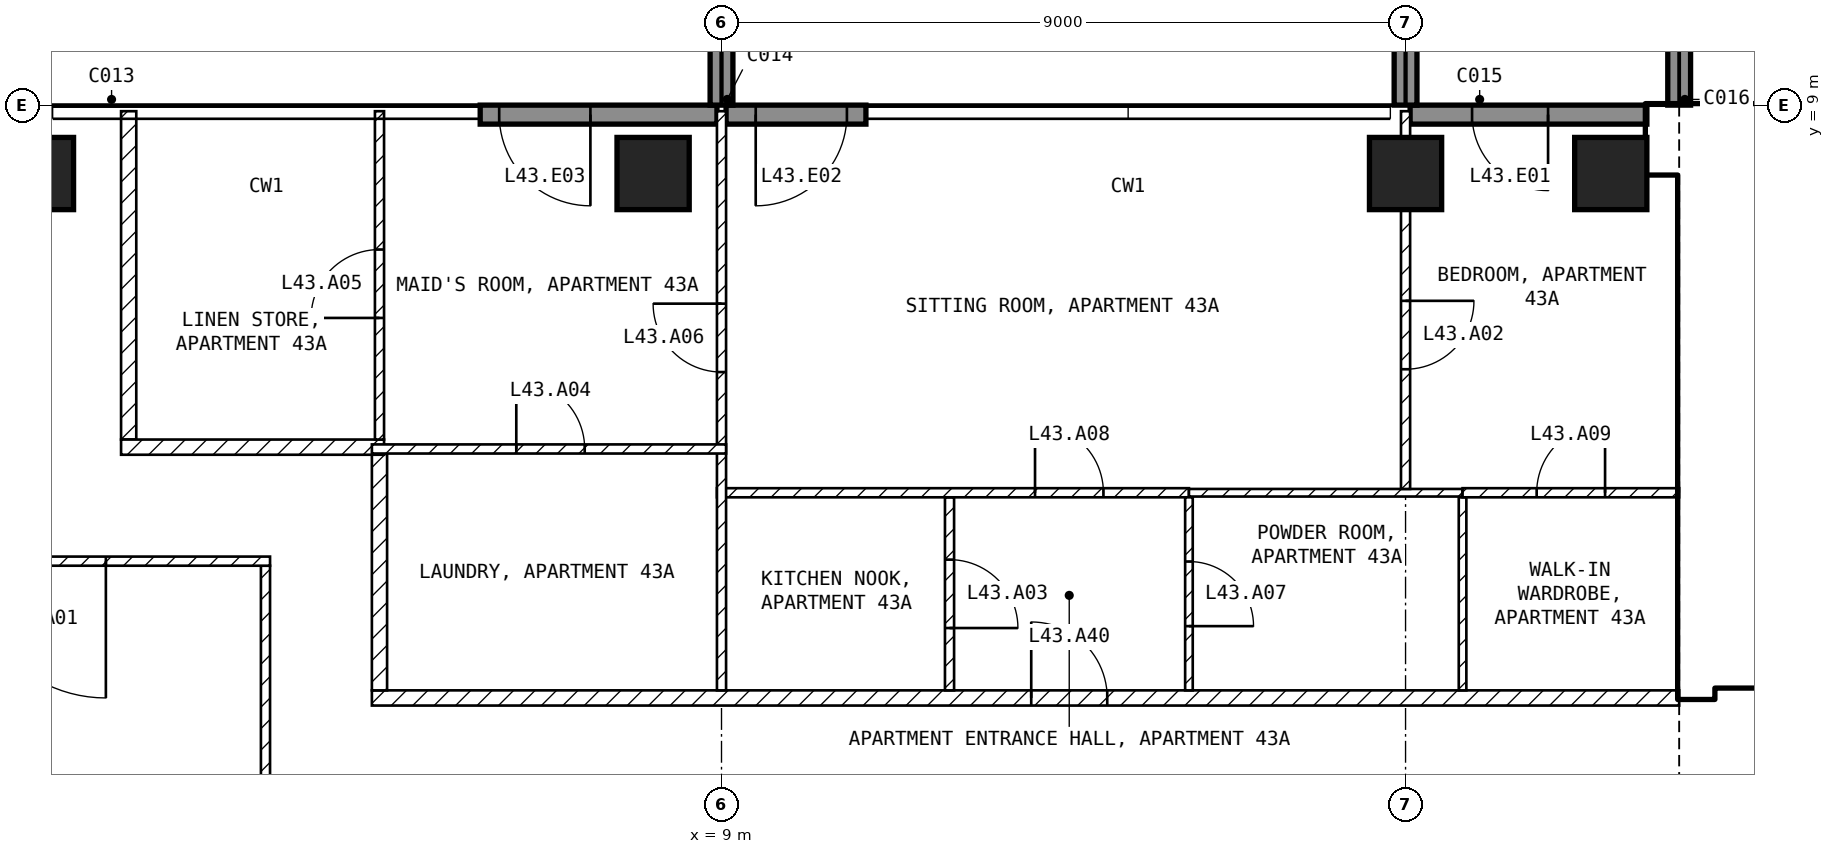
"""IFC4 building model, lengths in metres.
Left out: names, types, materials, properties, quantities, classifications, styles, units other than length and angle.
Written with IfcOpenShell. Run it as: python <this file> out.ifc"""

import sys

from ifc_helpers import new_model, si_unit, direction, frame, frame_2d, origin, origin_2d, place, context, subcontext, project, spatial, rectangle, extrude, element, fill, save


model = new_model("IFC4")
c1 = context("Model", 3, precision=1e-05, world=origin(), true_north=direction((0.0, 1.0)))
c2 = subcontext(c1, "Body", "Model", "MODEL_VIEW")
j1 = project(units=[si_unit("LENGTHUNIT", "METRE"), si_unit("PLANEANGLEUNIT", "RADIAN")], contexts=[c1])
p1 = place(None, origin())
s1 = spatial("IfcSite", under=j1, at=p1, CompositionType="ELEMENT")
p2 = place(p1, origin())
s2 = spatial("IfcBuilding", under=s1, at=p2, CompositionType="ELEMENT")
p3 = place(p2, frame((0.0, 0.0, 177.1)))
s3 = spatial("IfcBuildingStorey", under=s2, at=p3, CompositionType="ELEMENT", Elevation=177.1)
for number, where, z_axis, x_axis in (
    (1, (0.0, 8.1, -0.25), (0.0, 0.0, 1.0), (1.0, 0.0, 0.0)),
    (2, (8.1, 8.1, -0.25), (0.0, 0.0, 1.0), (1.0, 0.0, 0.0)),
    (3, (18.0, 8.1, -0.25), (0.0, 0.0, 1.0), (1.0, 0.0, 0.0)),
    (4, (20.7, 8.1, -0.25), (0.0, 0.0, 1.0), (1.0, 0.0, 0.0)),
):
    element("IfcColumn", number, at=place(p3, frame(where, z_axis=z_axis, x_axis=x_axis)), inside=s3, PredefinedType="COLUMN", context=c2, shape_type="SweptSolid", body=[
        extrude(rectangle(XDim=0.95, YDim=0.95, at=origin_2d()), origin(), (0.0, 0.0, 1.0), 3.5),
    ])
p4 = place(p3, frame((21.175, 8.875, 0.0), z_axis=(0.0, 0.0, 1.0), x_axis=(-1.0, 0.0, 0.0)))
e5 = element("IfcWall", 5, at=p4, inside=s3, PredefinedType="SOLIDWALL", context=c2, shape_type="SweptSolid", body=[
    extrude(rectangle(XDim=3.115, YDim=0.25, at=frame_2d((1.558, 0.0))), origin(), (0.0, 0.0, 1.0), 3.25),
])
p5 = place(p4, frame((1.3, 0.0, 0.0)))
e6 = element("IfcOpeningElement", 6, at=p5, cuts=e5, PredefinedType="OPENING", context=c2, shape_type="SweptSolid", body=[
    extrude(rectangle(XDim=1.0, YDim=2.4, at=frame_2d((0.5, 1.2))), frame((0.0, 0.135, 0.0), z_axis=(0.0, -1.0, 0.0), x_axis=(1.0, 0.0, 0.0)), (0.0, 0.0, 1.0), 0.27),
])
p6 = place(p3, frame((10.9, 8.875, 0.0), z_axis=(0.0, 0.0, 1.0), x_axis=(-1.0, 0.0, 0.0)))
e7 = element("IfcWall", 7, at=p6, inside=s3, PredefinedType="SOLIDWALL", context=c2, shape_type="SweptSolid", body=[
    extrude(rectangle(XDim=1.84, YDim=0.25, at=frame_2d((0.92, 0.0))), origin(), (0.0, 0.0, 1.0), 3.25),
])
p7 = place(p6, frame((0.25, 0.0, 0.0)))
e8 = element("IfcOpeningElement", 8, at=p7, cuts=e7, PredefinedType="OPENING", context=c2, shape_type="SweptSolid", body=[
    extrude(rectangle(XDim=1.2, YDim=2.4, at=frame_2d((0.6, 1.2))), frame((0.0, 0.135, 0.0), z_axis=(0.0, -1.0, 0.0), x_axis=(1.0, 0.0, 0.0)), (0.0, 0.0, 1.0), 0.27),
])
p8 = place(p3, frame((8.94, 8.875, 0.0), z_axis=(0.0, 0.0, 1.0), x_axis=(-1.0, 0.0, 0.0)))
e9 = element("IfcWall", 9, at=p8, inside=s3, PredefinedType="SOLIDWALL", context=c2, shape_type="SweptSolid", body=[
    extrude(rectangle(XDim=3.115, YDim=0.25, at=frame_2d((1.558, 0.0))), origin(), (0.0, 0.0, 1.0), 3.25),
])
p9 = place(p8, frame((1.665, 0.0, 0.0)))
e10 = element("IfcOpeningElement", 10, at=p9, cuts=e9, PredefinedType="OPENING", context=c2, shape_type="SweptSolid", body=[
    extrude(rectangle(XDim=1.2, YDim=2.4, at=frame_2d((0.6, 1.2))), frame((0.0, 0.135, 0.0), z_axis=(0.0, -1.0, 0.0), x_axis=(1.0, 0.0, 0.0)), (0.0, 0.0, 1.0), 0.27),
])
for number, where, z_axis, x_axis in (
    (11, (9.0, 9.0, 0.0), (0.0, 0.0, 1.0), (0.0, 1.0, 0.0)),
    (12, (18.0, 9.0, 0.0), (0.0, 0.0, 1.0), (0.0, 1.0, 0.0)),
    (13, (21.6, 9.0, 0.0), (0.0, 0.0, 1.0), (0.0, 1.0, 0.0)),
):
    element("IfcWall", number, at=place(p3, frame(where, z_axis=z_axis, x_axis=x_axis)), inside=s3, PredefinedType="SOLIDWALL", context=c2, shape_type="SweptSolid", body=[
        extrude(rectangle(XDim=2.7, YDim=0.3, at=frame_2d((1.35, 0.0))), origin(), (0.0, 0.0, 1.0), 3.25),
    ])
p10 = place(p3, frame((21.175, 8.55, 0.0), z_axis=(0.0, 0.0, 1.0), x_axis=(1.0, 0.0, 0.0)))
e14 = element("IfcWall", 14, at=p10, inside=s3, PredefinedType="SHEAR", context=c2, shape_type="SweptSolid", body=[
    extrude(rectangle(XDim=8.425, YDim=0.9, at=frame_2d((4.212, 0.0))), origin(), (0.0, 0.0, 1.0), 3.25),
])
p11 = place(p3, frame((21.825, 1.2, 0.0), z_axis=(0.0, 0.0, 1.0), x_axis=(0.0, 1.0, 0.0)))
e15 = element("IfcWall", 15, at=p11, inside=s3, PredefinedType="SHEAR", context=c2, shape_type="SweptSolid", body=[
    extrude(rectangle(XDim=6.9, YDim=0.45, at=frame_2d((3.45, 0.0))), origin(), (0.0, 0.0, 1.0), 3.25),
])
p12 = place(p3, frame((22.05, 1.45, 0.0), z_axis=(0.0, 0.0, 1.0), x_axis=(1.0, 0.0, 0.0)))
e16 = element("IfcWall", 16, at=p12, inside=s3, PredefinedType="SOLIDWALL", context=c2, shape_type="SweptSolid", body=[
    extrude(rectangle(XDim=11.15, YDim=0.2, at=frame_2d((5.575, 0.0))), origin(), (0.0, 0.0, 1.0), 3.25),
])
p13 = place(p12, frame((0.75, 0.0, 0.0)))
e17 = element("IfcOpeningElement", 17, at=p13, cuts=e16, PredefinedType="OPENING", context=c2, shape_type="SweptSolid", body=[
    extrude(rectangle(XDim=1.0, YDim=2.1, at=frame_2d((0.5, 1.05))), frame((0.0, 0.11, 0.0), z_axis=(0.0, -1.0, 0.0), x_axis=(1.0, 0.0, 0.0)), (0.0, 0.0, 1.0), 0.22),
])
p14 = place(p12, frame((3.25, 0.0, 0.0)))
e18 = element("IfcOpeningElement", 18, at=p14, cuts=e16, PredefinedType="OPENING", context=c2, shape_type="SweptSolid", body=[
    extrude(rectangle(XDim=1.0, YDim=2.1, at=frame_2d((0.5, 1.05))), frame((0.0, 0.11, 0.0), z_axis=(0.0, -1.0, 0.0), x_axis=(1.0, 0.0, 0.0)), (0.0, 0.0, 1.0), 0.22),
])
p15 = place(p12, frame((9.15, 0.0, 0.0)))
e19 = element("IfcOpeningElement", 19, at=p15, cuts=e16, PredefinedType="OPENING", context=c2, shape_type="SweptSolid", body=[
    extrude(rectangle(XDim=0.9, YDim=2.1, at=frame_2d((0.45, 1.05))), frame((0.0, 0.11, 0.0), z_axis=(0.0, -1.0, 0.0), x_axis=(1.0, 0.0, 0.0)), (0.0, 0.0, 1.0), 0.22),
])
p16 = place(p3, frame((22.05, 5.15, 0.0), z_axis=(0.0, 0.0, 1.0), x_axis=(1.0, 0.0, 0.0)))
e20 = element("IfcWall", 20, at=p16, inside=s3, PredefinedType="SOLIDWALL", context=c2, shape_type="SweptSolid", body=[
    extrude(rectangle(XDim=6.3, YDim=0.2, at=frame_2d((3.15, 0.0))), origin(), (0.0, 0.0, 1.0), 3.25),
])
p17 = place(p16, frame((0.2, 0.0, 0.0)))
e21 = element("IfcOpeningElement", 21, at=p17, cuts=e20, PredefinedType="OPENING", context=c2, shape_type="SweptSolid", body=[
    extrude(rectangle(XDim=1.0, YDim=2.1, at=frame_2d((0.5, 1.05))), frame((0.0, 0.11, 0.0), z_axis=(0.0, -1.0, 0.0), x_axis=(1.0, 0.0, 0.0)), (0.0, 0.0, 1.0), 0.22),
])
p18 = place(p3, frame((3.0, -2.94, 0.0), z_axis=(0.0, 0.0, 1.0), x_axis=(0.0, 1.0, 0.0)))
e22 = element("IfcWall", 22, at=p18, inside=s3, PredefinedType="PARTITIONING", context=c2, shape_type="SweptSolid", body=[
    extrude(rectangle(XDim=5.88, YDim=0.12, at=frame_2d((2.94, 0.0))), origin(), (0.0, 0.0, 1.0), 3.25),
])
p19 = place(p3, frame((3.06, 3.0, 0.0), z_axis=(0.0, 0.0, 1.0), x_axis=(-1.0, 0.0, 0.0)))
e23 = element("IfcWall", 23, at=p19, inside=s3, PredefinedType="PARTITIONING", context=c2, shape_type="SweptSolid", body=[
    extrude(rectangle(XDim=6.12, YDim=0.12, at=frame_2d((3.06, 0.0))), origin(), (0.0, 0.0, 1.0), 3.25),
])
p20 = place(p19, frame((2.16, 0.0, 0.0)))
e24 = element("IfcOpeningElement", 24, at=p20, cuts=e23, PredefinedType="OPENING", context=c2, shape_type="SweptSolid", body=[
    extrude(rectangle(XDim=1.8, YDim=2.1, at=frame_2d((0.9, 1.05))), frame((0.0, 0.07, 0.0), z_axis=(0.0, -1.0, 0.0), x_axis=(1.0, 0.0, 0.0)), (0.0, 0.0, 1.0), 0.14),
])
p21 = place(p3, frame((4.4, 1.2, 0.0), z_axis=(0.0, 0.0, 1.0), x_axis=(1.0, 0.0, 0.0)))
e25 = element("IfcWall", 25, at=p21, inside=s3, PredefinedType="PARTITIONING", context=c2, shape_type="SweptSolid", body=[
    extrude(rectangle(XDim=17.2, YDim=0.2, at=frame_2d((8.6, 0.0))), origin(), (0.0, 0.0, 1.0), 3.25),
])
p22 = place(p21, frame((8.675, 0.0, 0.0)))
e26 = element("IfcOpeningElement", 26, at=p22, cuts=e25, PredefinedType="OPENING", context=c2, shape_type="SweptSolid", body=[
    extrude(rectangle(XDim=1.0, YDim=2.1, at=frame_2d((0.5, 1.05))), frame((0.0, 0.11, 0.0), z_axis=(0.0, -1.0, 0.0), x_axis=(1.0, 0.0, 0.0)), (0.0, 0.0, 1.0), 0.22),
])
p23 = place(p3, frame((4.5, 4.416, 0.0), z_axis=(0.0, 0.0, 1.0), x_axis=(0.0, -1.0, 0.0)))
e27 = element("IfcWall", 27, at=p23, inside=s3, PredefinedType="PARTITIONING", context=c2, shape_type="SweptSolid", body=[
    extrude(rectangle(XDim=3.116, YDim=0.2, at=frame_2d((1.558, 0.0))), origin(), (0.0, 0.0, 1.0), 3.25),
])
p24 = place(p3, frame((1.2, 8.92, 0.0), z_axis=(0.0, 0.0, 1.0), x_axis=(0.0, -1.0, 0.0)))
e28 = element("IfcWall", 28, at=p24, inside=s3, PredefinedType="PARTITIONING", context=c2, shape_type="SweptSolid", body=[
    extrude(rectangle(XDim=4.32, YDim=0.2, at=frame_2d((2.16, 0.0))), origin(), (0.0, 0.0, 1.0), 3.25),
])
p25 = place(p3, frame((1.1, 4.5, 0.0), z_axis=(0.0, 0.0, 1.0), x_axis=(1.0, 0.0, 0.0)))
e29 = element("IfcWall", 29, at=p25, inside=s3, PredefinedType="PARTITIONING", context=c2, shape_type="SweptSolid", body=[
    extrude(rectangle(XDim=3.46, YDim=0.2, at=frame_2d((1.73, 0.0))), origin(), (0.0, 0.0, 1.0), 3.25),
])
p26 = place(p3, frame((12.0, 3.84, 0.0), z_axis=(0.0, 0.0, 1.0), x_axis=(0.0, -1.0, 0.0)))
e30 = element("IfcWall", 30, at=p26, inside=s3, PredefinedType="PARTITIONING", context=c2, shape_type="SweptSolid", body=[
    extrude(rectangle(XDim=2.54, YDim=0.12, at=frame_2d((1.27, 0.0))), origin(), (0.0, 0.0, 1.0), 3.25),
])
p27 = place(p26, frame((0.82, 0.0, 0.0)))
e31 = element("IfcOpeningElement", 31, at=p27, cuts=e30, PredefinedType="OPENING", context=c2, shape_type="SweptSolid", body=[
    extrude(rectangle(XDim=0.9, YDim=2.1, at=frame_2d((0.45, 1.05))), frame((0.0, 0.07, 0.0), z_axis=(0.0, -1.0, 0.0), x_axis=(1.0, 0.0, 0.0)), (0.0, 0.0, 1.0), 0.14),
])
p28 = place(p3, frame((8.94, 3.9, 0.0), z_axis=(0.0, 0.0, 1.0), x_axis=(1.0, 0.0, 0.0)))
e32 = element("IfcWall", 32, at=p28, inside=s3, PredefinedType="PARTITIONING", context=c2, shape_type="SweptSolid", body=[
    extrude(rectangle(XDim=6.21, YDim=0.12, at=frame_2d((3.105, 0.0))), origin(), (0.0, 0.0, 1.0), 3.25),
])
p29 = place(p28, frame((4.185, 0.0, 0.0)))
e33 = element("IfcOpeningElement", 33, at=p29, cuts=e32, PredefinedType="OPENING", context=c2, shape_type="SweptSolid", body=[
    extrude(rectangle(XDim=0.9, YDim=2.1, at=frame_2d((0.45, 1.05))), frame((0.0, 0.07, 0.0), z_axis=(0.0, -1.0, 0.0), x_axis=(1.0, 0.0, 0.0)), (0.0, 0.0, 1.0), 0.14),
])
p30 = place(p3, frame((9.0, 1.3, 0.0), z_axis=(0.0, 0.0, 1.0), x_axis=(0.0, 1.0, 0.0)))
e34 = element("IfcWall", 34, at=p30, inside=s3, PredefinedType="PARTITIONING", context=c2, shape_type="SweptSolid", body=[
    extrude(rectangle(XDim=7.62, YDim=0.12, at=frame_2d((3.81, 0.0))), origin(), (0.0, 0.0, 1.0), 3.25),
])
p31 = place(p30, frame((4.188, 0.0, 0.0)))
e35 = element("IfcOpeningElement", 35, at=p31, cuts=e34, PredefinedType="OPENING", context=c2, shape_type="SweptSolid", body=[
    extrude(rectangle(XDim=0.9, YDim=2.1, at=frame_2d((0.45, 1.05))), frame((0.0, 0.07, 0.0), z_axis=(0.0, -1.0, 0.0), x_axis=(1.0, 0.0, 0.0)), (0.0, 0.0, 1.0), 0.14),
])
p32 = place(p3, frame((15.15, 3.84, 0.0), z_axis=(0.0, 0.0, 1.0), x_axis=(0.0, -1.0, 0.0)))
e36 = element("IfcWall", 36, at=p32, inside=s3, PredefinedType="PARTITIONING", context=c2, shape_type="SweptSolid", body=[
    extrude(rectangle(XDim=2.54, YDim=0.1, at=frame_2d((1.27, 0.0))), origin(), (0.0, 0.0, 1.0), 3.25),
])
p33 = place(p32, frame((0.845, 0.0, 0.0)))
e37 = element("IfcOpeningElement", 37, at=p33, cuts=e36, PredefinedType="OPENING", context=c2, shape_type="SweptSolid", body=[
    extrude(rectangle(XDim=0.85, YDim=2.1, at=frame_2d((0.425, 1.05))), frame((0.0, 0.06, 0.0), z_axis=(0.0, -1.0, 0.0), x_axis=(1.0, 0.0, 0.0)), (0.0, 0.0, 1.0), 0.12),
])
p34 = place(p3, frame((18.75, 3.84, 0.0), z_axis=(0.0, 0.0, 1.0), x_axis=(0.0, -1.0, 0.0)))
e38 = element("IfcWall", 38, at=p34, inside=s3, PredefinedType="PARTITIONING", context=c2, shape_type="SweptSolid", body=[
    extrude(rectangle(XDim=2.54, YDim=0.1, at=frame_2d((1.27, 0.0))), origin(), (0.0, 0.0, 1.0), 3.25),
])
p35 = place(p3, frame((15.15, 3.9, 0.0), z_axis=(0.0, 0.0, 1.0), x_axis=(1.0, 0.0, 0.0)))
e39 = element("IfcWall", 39, at=p35, inside=s3, PredefinedType="PARTITIONING", context=c2, shape_type="SweptSolid", body=[
    extrude(rectangle(XDim=3.6, YDim=0.1, at=frame_2d((1.8, 0.0))), origin(), (0.0, 0.0, 1.0), 3.25),
])
p36 = place(p3, frame((18.75, 3.9, 0.0), z_axis=(0.0, 0.0, 1.0), x_axis=(1.0, 0.0, 0.0)))
e40 = element("IfcWall", 40, at=p36, inside=s3, PredefinedType="PARTITIONING", context=c2, shape_type="SweptSolid", body=[
    extrude(rectangle(XDim=2.85, YDim=0.12, at=frame_2d((1.425, 0.0))), origin(), (0.0, 0.0, 1.0), 3.25),
])
p37 = place(p36, frame((0.975, 0.0, 0.0)))
e41 = element("IfcOpeningElement", 41, at=p37, cuts=e40, PredefinedType="OPENING", context=c2, shape_type="SweptSolid", body=[
    extrude(rectangle(XDim=0.9, YDim=2.1, at=frame_2d((0.45, 1.05))), frame((0.0, 0.07, 0.0), z_axis=(0.0, -1.0, 0.0), x_axis=(1.0, 0.0, 0.0)), (0.0, 0.0, 1.0), 0.14),
])
p38 = place(p3, frame((18.0, 8.92, 0.0), z_axis=(0.0, 0.0, 1.0), x_axis=(0.0, -1.0, 0.0)))
e42 = element("IfcWall", 42, at=p38, inside=s3, PredefinedType="PARTITIONING", context=c2, shape_type="SweptSolid", body=[
    extrude(rectangle(XDim=4.97, YDim=0.12, at=frame_2d((2.485, 0.0))), origin(), (0.0, 0.0, 1.0), 2.48),
])
p39 = place(p38, frame((2.495, 0.0, 0.0)))
e43 = element("IfcOpeningElement", 43, at=p39, cuts=e42, PredefinedType="OPENING", context=c2, shape_type="SweptSolid", body=[
    extrude(rectangle(XDim=0.9, YDim=2.1, at=frame_2d((0.45, 1.05))), frame((0.0, 0.07, 0.0), z_axis=(0.0, -1.0, 0.0), x_axis=(1.0, 0.0, 0.0)), (0.0, 0.0, 1.0), 0.14),
])
p40 = place(p3, frame((4.4, 4.476, 0.0), z_axis=(0.0, 0.0, 1.0), x_axis=(1.0, 0.0, 0.0)))
e44 = element("IfcWall", 44, at=p40, inside=s3, PredefinedType="PARTITIONING", context=c2, shape_type="SweptSolid", body=[
    extrude(rectangle(XDim=4.66, YDim=0.12, at=frame_2d((2.33, 0.0))), origin(), (0.0, 0.0, 1.0), 3.25),
])
p41 = place(p40, frame((1.9, 0.0, 0.0)))
e45 = element("IfcOpeningElement", 45, at=p41, cuts=e44, PredefinedType="OPENING", context=c2, shape_type="SweptSolid", body=[
    extrude(rectangle(XDim=0.9, YDim=2.1, at=frame_2d((0.45, 1.05))), frame((0.0, 0.07, 0.0), z_axis=(0.0, -1.0, 0.0), x_axis=(1.0, 0.0, 0.0)), (0.0, 0.0, 1.0), 0.14),
])
p42 = place(p3, frame((4.5, 4.6, 0.0), z_axis=(0.0, 0.0, 1.0), x_axis=(0.0, 1.0, 0.0)))
e46 = element("IfcWall", 46, at=p42, inside=s3, PredefinedType="PARTITIONING", context=c2, shape_type="SweptSolid", body=[
    extrude(rectangle(XDim=4.32, YDim=0.12, at=frame_2d((2.16, 0.0))), origin(), (0.0, 0.0, 1.0), 3.25),
])
p43 = place(p42, frame((1.6, 0.0, 0.0)))
e47 = element("IfcOpeningElement", 47, at=p43, cuts=e46, PredefinedType="OPENING", context=c2, shape_type="SweptSolid", body=[
    extrude(rectangle(XDim=0.9, YDim=2.1, at=frame_2d((0.45, 1.05))), frame((0.0, 0.07, 0.0), z_axis=(0.0, -1.0, 0.0), x_axis=(1.0, 0.0, 0.0)), (0.0, 0.0, 1.0), 0.14),
])
p44 = place(p5, origin())
e48 = element("IfcDoor", 48, at=p44, inside=s3, OperationType="SINGLE_SWING_LEFT", PredefinedType="DOOR", context=c2, shape_type="SweptSolid", body=[
    extrude(rectangle(XDim=1.0, YDim=2.4, at=frame_2d((0.5, 1.2))), frame((0.0, 0.025, 0.0), z_axis=(0.0, -1.0, 0.0), x_axis=(1.0, 0.0, 0.0)), (0.0, 0.0, 1.0), 0.05),
])
fill(e6, e48)
p45 = place(p7, origin())
e49 = element("IfcDoor", 49, at=p45, inside=s3, OperationType="SINGLE_SWING_RIGHT", PredefinedType="DOOR", context=c2, shape_type="SweptSolid", body=[
    extrude(rectangle(XDim=1.2, YDim=2.4, at=frame_2d((0.6, 1.2))), frame((0.0, 0.025, 0.0), z_axis=(0.0, -1.0, 0.0), x_axis=(1.0, 0.0, 0.0)), (0.0, 0.0, 1.0), 0.05),
])
fill(e8, e49)
p46 = place(p9, origin())
e50 = element("IfcDoor", 50, at=p46, inside=s3, OperationType="SINGLE_SWING_LEFT", PredefinedType="DOOR", context=c2, shape_type="SweptSolid", body=[
    extrude(rectangle(XDim=1.2, YDim=2.4, at=frame_2d((0.6, 1.2))), frame((0.0, 0.025, 0.0), z_axis=(0.0, -1.0, 0.0), x_axis=(1.0, 0.0, 0.0)), (0.0, 0.0, 1.0), 0.05),
])
fill(e10, e50)
p47 = place(p17, origin())
e51 = element("IfcDoor", 51, at=p47, inside=s3, OperationType="SINGLE_SWING_LEFT", PredefinedType="DOOR", context=c2, shape_type="SweptSolid", body=[
    extrude(rectangle(XDim=1.0, YDim=2.1, at=frame_2d((0.5, 1.05))), frame((0.0, 0.025, 0.0), z_axis=(0.0, -1.0, 0.0), x_axis=(1.0, 0.0, 0.0)), (0.0, 0.0, 1.0), 0.05),
])
fill(e21, e51)
p48 = place(p20, origin())
e52 = element("IfcDoor", 52, at=p48, inside=s3, OperationType="SINGLE_SWING_LEFT", PredefinedType="DOOR", context=c2, shape_type="SweptSolid", body=[
    extrude(rectangle(XDim=1.8, YDim=2.1, at=frame_2d((0.9, 1.05))), frame((0.0, 0.025, 0.0), z_axis=(0.0, -1.0, 0.0), x_axis=(1.0, 0.0, 0.0)), (0.0, 0.0, 1.0), 0.05),
])
fill(e24, e52)
p49 = place(p39, origin())
e53 = element("IfcDoor", 53, at=p49, inside=s3, OperationType="SINGLE_SWING_LEFT", PredefinedType="DOOR", context=c2, shape_type="SweptSolid", body=[
    extrude(rectangle(XDim=0.9, YDim=2.1, at=frame_2d((0.45, 1.05))), frame((0.0, 0.025, 0.0), z_axis=(0.0, -1.0, 0.0), x_axis=(1.0, 0.0, 0.0)), (0.0, 0.0, 1.0), 0.05),
])
fill(e43, e53)
p50 = place(p27, origin())
e54 = element("IfcDoor", 54, at=p50, inside=s3, OperationType="SINGLE_SWING_RIGHT", PredefinedType="DOOR", context=c2, shape_type="SweptSolid", body=[
    extrude(rectangle(XDim=0.9, YDim=2.1, at=frame_2d((0.45, 1.05))), frame((0.0, 0.025, 0.0), z_axis=(0.0, -1.0, 0.0), x_axis=(1.0, 0.0, 0.0)), (0.0, 0.0, 1.0), 0.05),
])
fill(e31, e54)
p51 = place(p41, origin())
e55 = element("IfcDoor", 55, at=p51, inside=s3, OperationType="SINGLE_SWING_LEFT", PredefinedType="DOOR", context=c2, shape_type="SweptSolid", body=[
    extrude(rectangle(XDim=0.9, YDim=2.1, at=frame_2d((0.45, 1.05))), frame((0.0, 0.025, 0.0), z_axis=(0.0, -1.0, 0.0), x_axis=(1.0, 0.0, 0.0)), (0.0, 0.0, 1.0), 0.05),
])
fill(e45, e55)
p52 = place(p43, origin())
e56 = element("IfcDoor", 56, at=p52, inside=s3, OperationType="SINGLE_SWING_LEFT", PredefinedType="DOOR", context=c2, shape_type="SweptSolid", body=[
    extrude(rectangle(XDim=0.9, YDim=2.1, at=frame_2d((0.45, 1.05))), frame((0.0, 0.025, 0.0), z_axis=(0.0, -1.0, 0.0), x_axis=(1.0, 0.0, 0.0)), (0.0, 0.0, 1.0), 0.05),
])
fill(e47, e56)
p53 = place(p31, origin())
e57 = element("IfcDoor", 57, at=p53, inside=s3, OperationType="SINGLE_SWING_RIGHT", PredefinedType="DOOR", context=c2, shape_type="SweptSolid", body=[
    extrude(rectangle(XDim=0.9, YDim=2.1, at=frame_2d((0.45, 1.05))), frame((0.0, 0.025, 0.0), z_axis=(0.0, -1.0, 0.0), x_axis=(1.0, 0.0, 0.0)), (0.0, 0.0, 1.0), 0.05),
])
fill(e35, e57)
p54 = place(p33, origin())
e58 = element("IfcDoor", 58, at=p54, inside=s3, OperationType="SINGLE_SWING_RIGHT", PredefinedType="DOOR", context=c2, shape_type="SweptSolid", body=[
    extrude(rectangle(XDim=0.85, YDim=2.1, at=frame_2d((0.425, 1.05))), frame((0.0, 0.025, 0.0), z_axis=(0.0, -1.0, 0.0), x_axis=(1.0, 0.0, 0.0)), (0.0, 0.0, 1.0), 0.05),
])
fill(e37, e58)
p55 = place(p29, origin())
e59 = element("IfcDoor", 59, at=p55, inside=s3, OperationType="SINGLE_SWING_LEFT", PredefinedType="DOOR", context=c2, shape_type="SweptSolid", body=[
    extrude(rectangle(XDim=0.9, YDim=2.1, at=frame_2d((0.45, 1.05))), frame((0.0, 0.025, 0.0), z_axis=(0.0, -1.0, 0.0), x_axis=(1.0, 0.0, 0.0)), (0.0, 0.0, 1.0), 0.05),
])
fill(e33, e59)
p56 = place(p37, origin())
e60 = element("IfcDoor", 60, at=p56, inside=s3, OperationType="SINGLE_SWING_RIGHT", PredefinedType="DOOR", context=c2, shape_type="SweptSolid", body=[
    extrude(rectangle(XDim=0.9, YDim=2.1, at=frame_2d((0.45, 1.05))), frame((0.0, 0.025, 0.0), z_axis=(0.0, -1.0, 0.0), x_axis=(1.0, 0.0, 0.0)), (0.0, 0.0, 1.0), 0.05),
])
fill(e41, e60)
p57 = place(p22, origin())
e61 = element("IfcDoor", 61, at=p57, inside=s3, OperationType="SINGLE_SWING_LEFT", PredefinedType="DOOR", context=c2, shape_type="SweptSolid", body=[
    extrude(rectangle(XDim=1.0, YDim=2.1, at=frame_2d((0.5, 1.05))), frame((0.0, 0.025, 0.0), z_axis=(0.0, -1.0, 0.0), x_axis=(1.0, 0.0, 0.0)), (0.0, 0.0, 1.0), 0.05),
])
fill(e26, e61)
save(model, sys.argv[1])
